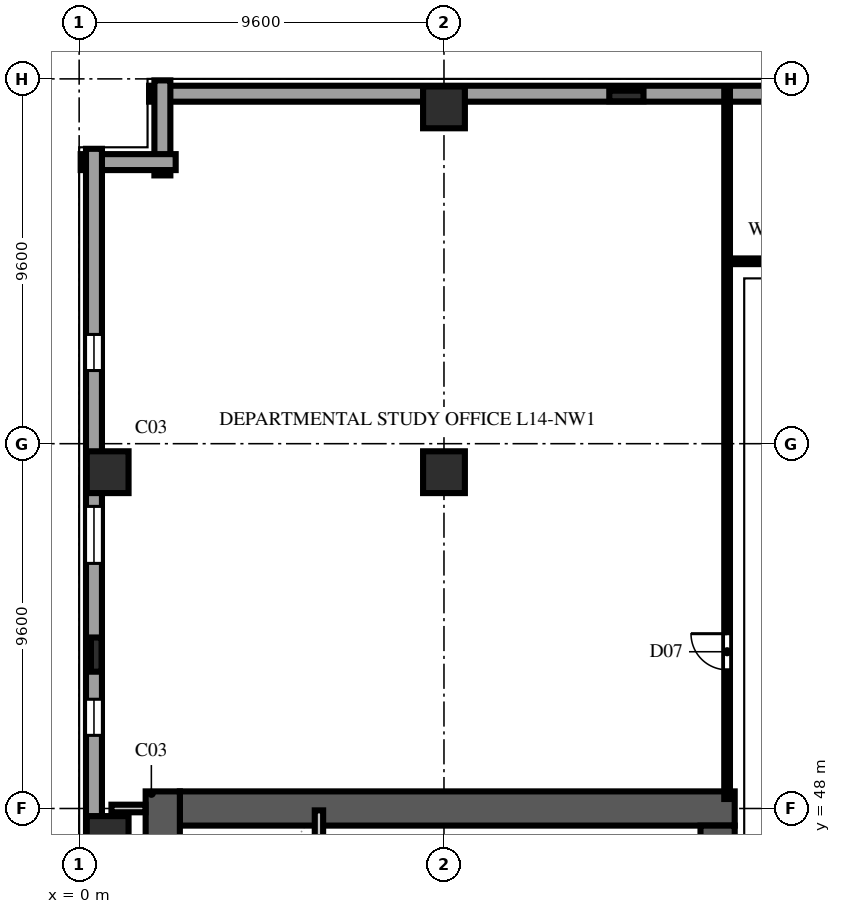
"""IFC4 building model, lengths in metres.
Left out: names, types, materials, properties, quantities, classifications, styles, units other than length and angle.
Written with IfcOpenShell. Run it as: python <this file> out.ifc"""

import sys

from ifc_helpers import new_model, si_unit, direction, frame, frame_2d, origin, origin_2d, place, context, subcontext, project, spatial, rectangle, extrude, element, fill, save


model = new_model("IFC4")
c1 = context("Model", 3, precision=1e-05, world=origin(), true_north=direction((0.0, 1.0)))
c2 = subcontext(c1, "Body", "Model", "MODEL_VIEW")
j1 = project(units=[si_unit("LENGTHUNIT", "METRE"), si_unit("PLANEANGLEUNIT", "RADIAN")], contexts=[c1])
p1 = place(None, origin())
s1 = spatial("IfcSite", under=j1, at=p1, CompositionType="ELEMENT")
p2 = place(p1, origin())
s2 = spatial("IfcBuilding", under=s1, at=p2, CompositionType="ELEMENT")
p3 = place(p2, frame((0.0, 0.0, 58.4)))
s3 = spatial("IfcBuildingStorey", under=s2, at=p3, CompositionType="ELEMENT", Elevation=58.4)
p4 = place(p3, frame((2.65, 48.0, 0.0), z_axis=(0.0, 0.0, 1.0), x_axis=(1.0, 0.0, 0.0)))
e1 = element("IfcWall", 1, at=p4, inside=s3, PredefinedType="SHEAR", context=c2, shape_type="SweptSolid", body=[
    extrude(rectangle(XDim=14.6, YDim=0.9, at=frame_2d((7.3, 0.0))), origin(), (0.0, 0.0, 1.0), 3.54),
])
p5 = place(p3, frame((2.2, 9.15, 0.0), z_axis=(0.0, 0.0, 1.0), x_axis=(0.0, 1.0, 0.0)))
e2 = element("IfcWall", 2, at=p5, inside=s3, PredefinedType="SHEAR", context=c2, shape_type="SweptSolid", body=[
    extrude(rectangle(XDim=39.3, YDim=0.9, at=frame_2d((19.65, 0.0))), origin(), (0.0, 0.0, 1.0), 3.54),
])
p6 = place(p3, frame((16.8, 36.4, 0.0), z_axis=(0.0, 0.0, 1.0), x_axis=(0.0, 1.0, 0.0)))
e3 = element("IfcWall", 3, at=p6, inside=s3, PredefinedType="SHEAR", context=c2, shape_type="SweptSolid", body=[
    extrude(rectangle(XDim=11.15, YDim=0.9, at=frame_2d((5.575, 0.0))), origin(), (0.0, 0.0, 1.0), 3.54),
])
p7 = place(p6, frame((9.2, 0.0, 0.0)))
e4 = element("IfcOpeningElement", 4, at=p7, cuts=e3, PredefinedType="OPENING", context=c2, shape_type="SweptSolid", body=[
    extrude(rectangle(XDim=0.95, YDim=2.15, at=frame_2d((0.475, 1.075))), frame((0.0, 0.462, 0.0), z_axis=(0.0, -1.0, 0.0), x_axis=(1.0, 0.0, 0.0)), (0.0, 0.0, 1.0), 0.924),
])
for number, where, z_axis, x_axis in (
    (5, (0.75, 47.25, 0.0), (0.0, 0.0, 1.0), (1.0, 0.0, 0.0)),
    (6, (0.75, 56.85, 0.0), (0.0, 0.0, 1.0), (1.0, 0.0, 0.0)),
    (7, (9.6, 56.85, 0.0), (0.0, 0.0, 1.0), (1.0, 0.0, 0.0)),
    (8, (9.6, 66.45, 0.0), (0.0, 0.0, 1.0), (1.0, 0.0, 0.0)),
):
    element("IfcColumn", number, at=place(p3, frame(where, z_axis=z_axis, x_axis=x_axis)), inside=s3, PredefinedType="COLUMN", context=c2, shape_type="SweptSolid", body=[
        extrude(rectangle(XDim=1.1, YDim=1.1, at=origin_2d()), origin(), (0.0, 0.0, 1.0), 3.8),
    ])
for number, where, z_axis, x_axis in (
    (9, (0.45, 52.05, 0.0), (0.0, 0.0, 1.0), (0.0, 1.0, 0.0)),
    (10, (14.4, 66.75, 0.0), (0.0, 0.0, 1.0), (1.0, 0.0, 0.0)),
):
    element("IfcColumn", number, at=place(p3, frame(where, z_axis=z_axis, x_axis=x_axis)), inside=s3, PredefinedType="PILASTER", context=c2, shape_type="SweptSolid", body=[
        extrude(rectangle(XDim=0.9, YDim=0.28, at=origin_2d()), origin(), (0.0, 0.0, 1.0), 3.8),
    ])
p8 = place(p3, frame((36.56, 66.81, 0.0), z_axis=(0.0, 0.0, 1.0), x_axis=(-1.0, 0.0, 0.0)))
e11 = element("IfcWall", 11, at=p8, inside=s3, PredefinedType="SOLIDWALL", context=c2, shape_type="SweptSolid", body=[
    extrude(rectangle(XDim=34.72, YDim=0.42, at=frame_2d((17.36, 0.0))), origin(), (0.0, 0.0, 1.0), 3.54),
])
p9 = place(p8, frame((4.885, 0.0, 0.9)))
e12 = element("IfcOpeningElement", 12, at=p9, cuts=e11, PredefinedType="OPENING", context=c2, shape_type="SweptSolid", body=[
    extrude(rectangle(XDim=0.95, YDim=1.85, at=frame_2d((0.475, 0.925))), frame((0.0, 0.222, 0.0), z_axis=(0.0, -1.0, 0.0), x_axis=(1.0, 0.0, 0.0)), (0.0, 0.0, 1.0), 0.444),
])
p10 = place(p8, frame((9.41, 0.0, 0.9)))
e13 = element("IfcOpeningElement", 13, at=p10, cuts=e11, PredefinedType="OPENING", context=c2, shape_type="SweptSolid", body=[
    extrude(rectangle(XDim=1.5, YDim=1.85, at=frame_2d((0.75, 0.925))), frame((0.0, 0.222, 0.0), z_axis=(0.0, -1.0, 0.0), x_axis=(1.0, 0.0, 0.0)), (0.0, 0.0, 1.0), 0.444),
])
p11 = place(p8, frame((14.485, 0.0, 0.9)))
e14 = element("IfcOpeningElement", 14, at=p11, cuts=e11, PredefinedType="OPENING", context=c2, shape_type="SweptSolid", body=[
    extrude(rectangle(XDim=0.95, YDim=1.85, at=frame_2d((0.475, 0.925))), frame((0.0, 0.222, 0.0), z_axis=(0.0, -1.0, 0.0), x_axis=(1.0, 0.0, 0.0)), (0.0, 0.0, 1.0), 0.444),
])
for number, where, z_axis, x_axis in (
    (15, (2.19, 67.16, 0.0), (0.0, 0.0, 1.0), (0.0, -1.0, 0.0)),
    (16, (2.54, 65.01, 0.0), (0.0, 0.0, 1.0), (-1.0, 0.0, 0.0)),
):
    element("IfcWall", number, at=place(p3, frame(where, z_axis=z_axis, x_axis=x_axis)), inside=s3, PredefinedType="SOLIDWALL", context=c2, shape_type="SweptSolid", body=[
        extrude(rectangle(XDim=2.5, YDim=0.42, at=frame_2d((1.25, 0.0))), origin(), (0.0, 0.0, 1.0), 3.54),
    ])
p12 = place(p3, frame((0.39, 65.36, 0.0), z_axis=(0.0, 0.0, 1.0), x_axis=(0.0, -1.0, 0.0)))
e17 = element("IfcWall", 17, at=p12, inside=s3, PredefinedType="SOLIDWALL", context=c2, shape_type="SweptSolid", body=[
    extrude(rectangle(XDim=63.52, YDim=0.42, at=frame_2d((31.76, 0.0))), origin(), (0.0, 0.0, 1.0), 3.54),
])
p13 = place(p12, frame((4.885, 0.0, 0.9)))
e18 = element("IfcOpeningElement", 18, at=p13, cuts=e17, PredefinedType="OPENING", context=c2, shape_type="SweptSolid", body=[
    extrude(rectangle(XDim=0.95, YDim=1.85, at=frame_2d((0.475, 0.925))), frame((0.0, 0.222, 0.0), z_axis=(0.0, -1.0, 0.0), x_axis=(1.0, 0.0, 0.0)), (0.0, 0.0, 1.0), 0.444),
])
p14 = place(p12, frame((9.41, 0.0, 0.9)))
e19 = element("IfcOpeningElement", 19, at=p14, cuts=e17, PredefinedType="OPENING", context=c2, shape_type="SweptSolid", body=[
    extrude(rectangle(XDim=1.5, YDim=1.85, at=frame_2d((0.75, 0.925))), frame((0.0, 0.222, 0.0), z_axis=(0.0, -1.0, 0.0), x_axis=(1.0, 0.0, 0.0)), (0.0, 0.0, 1.0), 0.444),
])
p15 = place(p12, frame((14.485, 0.0, 0.9)))
e20 = element("IfcOpeningElement", 20, at=p15, cuts=e17, PredefinedType="OPENING", context=c2, shape_type="SweptSolid", body=[
    extrude(rectangle(XDim=0.95, YDim=1.85, at=frame_2d((0.475, 0.925))), frame((0.0, 0.222, 0.0), z_axis=(0.0, -1.0, 0.0), x_axis=(1.0, 0.0, 0.0)), (0.0, 0.0, 1.0), 0.444),
])
p16 = place(p12, frame((19.01, 0.0, 0.9)))
e21 = element("IfcOpeningElement", 21, at=p16, cuts=e17, PredefinedType="OPENING", context=c2, shape_type="SweptSolid", body=[
    extrude(rectangle(XDim=1.5, YDim=1.85, at=frame_2d((0.75, 0.925))), frame((0.0, 0.222, 0.0), z_axis=(0.0, -1.0, 0.0), x_axis=(1.0, 0.0, 0.0)), (0.0, 0.0, 1.0), 0.444),
])
p17 = place(p12, frame((24.085, 0.0, 0.9)))
e22 = element("IfcOpeningElement", 22, at=p17, cuts=e17, PredefinedType="OPENING", context=c2, shape_type="SweptSolid", body=[
    extrude(rectangle(XDim=0.95, YDim=1.85, at=frame_2d((0.475, 0.925))), frame((0.0, 0.222, 0.0), z_axis=(0.0, -1.0, 0.0), x_axis=(1.0, 0.0, 0.0)), (0.0, 0.0, 1.0), 0.444),
])
p18 = place(p12, frame((28.61, 0.0, 0.9)))
e23 = element("IfcOpeningElement", 23, at=p18, cuts=e17, PredefinedType="OPENING", context=c2, shape_type="SweptSolid", body=[
    extrude(rectangle(XDim=1.5, YDim=1.85, at=frame_2d((0.75, 0.925))), frame((0.0, 0.222, 0.0), z_axis=(0.0, -1.0, 0.0), x_axis=(1.0, 0.0, 0.0)), (0.0, 0.0, 1.0), 0.444),
])
p19 = place(p12, frame((33.685, 0.0, 0.9)))
e24 = element("IfcOpeningElement", 24, at=p19, cuts=e17, PredefinedType="OPENING", context=c2, shape_type="SweptSolid", body=[
    extrude(rectangle(XDim=0.95, YDim=1.85, at=frame_2d((0.475, 0.925))), frame((0.0, 0.222, 0.0), z_axis=(0.0, -1.0, 0.0), x_axis=(1.0, 0.0, 0.0)), (0.0, 0.0, 1.0), 0.444),
])
p20 = place(p12, frame((38.21, 0.0, 0.9)))
e25 = element("IfcOpeningElement", 25, at=p20, cuts=e17, PredefinedType="OPENING", context=c2, shape_type="SweptSolid", body=[
    extrude(rectangle(XDim=1.5, YDim=1.85, at=frame_2d((0.75, 0.925))), frame((0.0, 0.222, 0.0), z_axis=(0.0, -1.0, 0.0), x_axis=(1.0, 0.0, 0.0)), (0.0, 0.0, 1.0), 0.444),
])
p21 = place(p12, frame((43.285, 0.0, 0.9)))
e26 = element("IfcOpeningElement", 26, at=p21, cuts=e17, PredefinedType="OPENING", context=c2, shape_type="SweptSolid", body=[
    extrude(rectangle(XDim=0.95, YDim=1.85, at=frame_2d((0.475, 0.925))), frame((0.0, 0.222, 0.0), z_axis=(0.0, -1.0, 0.0), x_axis=(1.0, 0.0, 0.0)), (0.0, 0.0, 1.0), 0.444),
])
p22 = place(p12, frame((47.81, 0.0, 0.9)))
e27 = element("IfcOpeningElement", 27, at=p22, cuts=e17, PredefinedType="OPENING", context=c2, shape_type="SweptSolid", body=[
    extrude(rectangle(XDim=1.5, YDim=1.85, at=frame_2d((0.75, 0.925))), frame((0.0, 0.222, 0.0), z_axis=(0.0, -1.0, 0.0), x_axis=(1.0, 0.0, 0.0)), (0.0, 0.0, 1.0), 0.444),
])
p23 = place(p12, frame((52.885, 0.0, 0.9)))
e28 = element("IfcOpeningElement", 28, at=p23, cuts=e17, PredefinedType="OPENING", context=c2, shape_type="SweptSolid", body=[
    extrude(rectangle(XDim=0.95, YDim=1.85, at=frame_2d((0.475, 0.925))), frame((0.0, 0.222, 0.0), z_axis=(0.0, -1.0, 0.0), x_axis=(1.0, 0.0, 0.0)), (0.0, 0.0, 1.0), 0.444),
])
p24 = place(p3, frame((6.31, 40.14, 0.0), z_axis=(0.0, 0.0, 1.0), x_axis=(0.0, 1.0, 0.0)))
e29 = element("IfcWall", 29, at=p24, inside=s3, PredefinedType="SOLIDWALL", context=c2, shape_type="SweptSolid", body=[
    extrude(rectangle(XDim=7.81, YDim=0.22, at=frame_2d((3.905, 0.0))), origin(), (0.0, 0.0, 1.0), 3.54),
])
p25 = place(p3, frame((0.85, 48.0, 0.0), z_axis=(0.0, 0.0, 1.0), x_axis=(1.0, 0.0, 0.0)))
e30 = element("IfcWall", 30, at=p25, inside=s3, PredefinedType="SOLIDWALL", context=c2, shape_type="SweptSolid", body=[
    extrude(rectangle(XDim=0.895, YDim=0.2, at=frame_2d((0.448, 0.0))), origin(), (0.0, 0.0, 1.0), 3.54),
])
p26 = place(p3, frame((17.05, 62.4, 0.0), z_axis=(0.0, 0.0, 1.0), x_axis=(1.0, 0.0, 0.0)))
e31 = element("IfcWall", 31, at=p26, inside=s3, PredefinedType="PARTITIONING", context=c2, shape_type="SweptSolid", body=[
    extrude(rectangle(XDim=2.15, YDim=0.15, at=frame_2d((1.075, 0.0))), origin(), (0.0, 0.0, 1.0), 3.54),
])
p27 = place(p3, frame((17.05, 48.25, 0.0), z_axis=(0.0, 0.0, 1.0), x_axis=(0.0, 1.0, 0.0)))
e32 = element("IfcWall", 32, at=p27, inside=s3, PredefinedType="PARTITIONING", context=c2, shape_type="SweptSolid", body=[
    extrude(rectangle(XDim=18.73, YDim=0.15, at=frame_2d((9.365, 0.0))), origin(), (0.0, 0.0, 1.0), 3.54),
])
p28 = place(p27, frame((3.4, 0.0, 0.0)))
e33 = element("IfcOpeningElement", 33, at=p28, cuts=e32, PredefinedType="OPENING", context=c2, shape_type="SweptSolid", body=[
    extrude(rectangle(XDim=0.95, YDim=2.15, at=frame_2d((0.475, 1.075))), frame((0.0, 0.087, 0.0), z_axis=(0.0, -1.0, 0.0), x_axis=(1.0, 0.0, 0.0)), (0.0, 0.0, 1.0), 0.174),
])
p29 = place(p13, origin())
e34 = element("IfcWindow", 34, at=p29, inside=s3, PartitioningType="SINGLE_PANEL", PredefinedType="WINDOW", context=c2, shape_type="SweptSolid", body=[
    extrude(rectangle(XDim=0.95, YDim=1.85, at=frame_2d((0.475, 0.925))), frame((0.0, 0.11, 0.0), z_axis=(0.0, -1.0, 0.0), x_axis=(1.0, 0.0, 0.0)), (0.0, 0.0, 1.0), 0.06),
])
fill(e18, e34)
p30 = place(p14, origin())
e35 = element("IfcWindow", 35, at=p30, inside=s3, PartitioningType="DOUBLE_PANEL_VERTICAL", PredefinedType="WINDOW", context=c2, shape_type="SweptSolid", body=[
    extrude(rectangle(XDim=1.5, YDim=1.85, at=frame_2d((0.75, 0.925))), frame((0.0, 0.11, 0.0), z_axis=(0.0, -1.0, 0.0), x_axis=(1.0, 0.0, 0.0)), (0.0, 0.0, 1.0), 0.06),
])
fill(e19, e35)
p31 = place(p15, origin())
e36 = element("IfcWindow", 36, at=p31, inside=s3, PartitioningType="SINGLE_PANEL", PredefinedType="WINDOW", context=c2, shape_type="SweptSolid", body=[
    extrude(rectangle(XDim=0.95, YDim=1.85, at=frame_2d((0.475, 0.925))), frame((0.0, 0.11, 0.0), z_axis=(0.0, -1.0, 0.0), x_axis=(1.0, 0.0, 0.0)), (0.0, 0.0, 1.0), 0.06),
])
fill(e20, e36)
p32 = place(p28, origin())
e37 = element("IfcDoor", 37, at=p32, inside=s3, OperationType="SINGLE_SWING_RIGHT", PredefinedType="DOOR", context=c2, shape_type="SweptSolid", body=[
    extrude(rectangle(XDim=0.95, YDim=2.15, at=frame_2d((0.475, 1.075))), frame((0.0, 0.025, 0.0), z_axis=(0.0, -1.0, 0.0), x_axis=(1.0, 0.0, 0.0)), (0.0, 0.0, 1.0), 0.05),
])
fill(e33, e37)
save(model, sys.argv[1])
